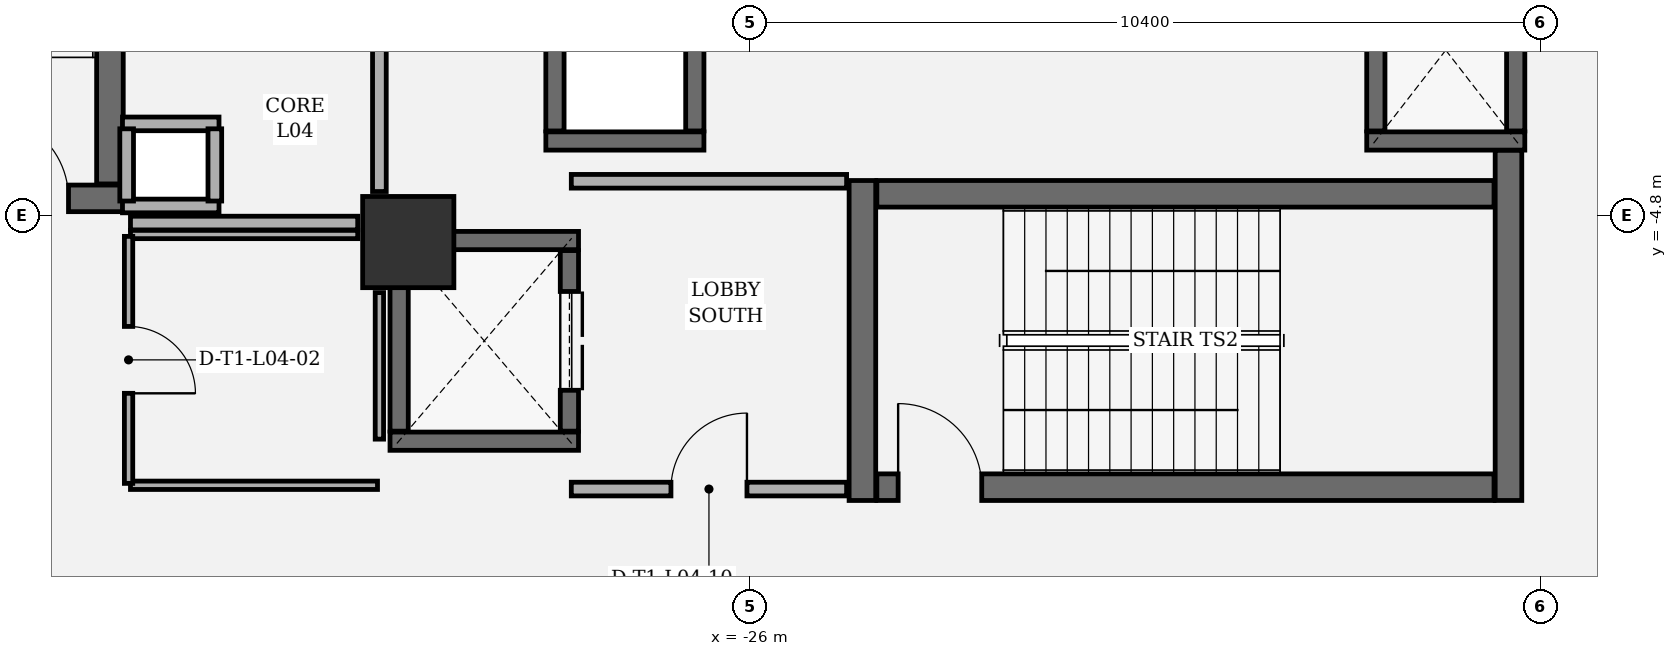
"""IFC4 building model, lengths in metres.
Left out: names, types, materials, properties, quantities, classifications, styles, units other than length and angle.
Written with IfcOpenShell. Run it as: python <this file> out.ifc"""

import sys

from ifc_helpers import new_model, si_unit, direction, frame, frame_2d, origin, origin_2d, place, context, subcontext, project, spatial, rectangle, extrude, element, fill, save


model = new_model("IFC4")
c1 = context("Model", 3, precision=1e-05, world=origin(), true_north=direction((0.0, 1.0)))
c2 = subcontext(c1, "Body", "Model", "MODEL_VIEW")
j1 = project(units=[si_unit("LENGTHUNIT", "METRE"), si_unit("PLANEANGLEUNIT", "RADIAN")], contexts=[c1])
p1 = place(None, origin())
s1 = spatial("IfcSite", under=j1, at=p1, CompositionType="ELEMENT")
p2 = place(p1, origin())
s2 = spatial("IfcBuilding", under=s1, at=p2, CompositionType="ELEMENT")
p3 = place(p2, frame((0.0, 0.0, 22.0)))
s3 = spatial("IfcBuildingStorey", under=s2, at=p3, CompositionType="ELEMENT", Elevation=22.0)
p4 = place(p3, frame((-30.5, -5.15, 0.0), z_axis=(0.0, 0.0, 1.0), x_axis=(1.0, 0.0, 0.0)))
e1 = element("IfcColumn", 1, at=p4, inside=s3, PredefinedType="COLUMN", context=c2, shape_type="SweptSolid", body=[
    extrude(rectangle(XDim=1.2, YDim=1.2, at=origin_2d()), origin(), (0.0, 0.0, 1.0), 5.0),
])
p5 = place(p3, frame((-13.635, -37.094, 0.0), z_axis=(0.0, 0.0, 1.0), x_axis=(-0.842602364841, 0.538536214905, 0.0)))
e2 = element("IfcWall", 2, at=p5, inside=s3, PredefinedType="SOLIDWALL", context=c2, shape_type="SweptSolid", body=[
    extrude(rectangle(XDim=60.27, YDim=0.38, at=frame_2d((30.135, 0.0))), origin(), (0.0, 0.0, 1.0), 4.58),
])
p6 = place(p5, frame((29.435, 0.0, 0.8)))
e3 = element("IfcOpeningElement", 3, at=p6, cuts=e2, PredefinedType="OPENING", context=c2, shape_type="SweptSolid", body=[
    extrude(rectangle(XDim=1.4, YDim=1.5, at=frame_2d((0.7, 0.75))), frame((0.0, 0.2, 0.0), z_axis=(0.0, -1.0, 0.0), x_axis=(1.0, 0.0, 0.0)), (0.0, 0.0, 1.0), 0.4),
])
p7 = place(p3, frame((-24.525, -4.34, 0.0), z_axis=(0.0, 0.0, 1.0), x_axis=(0.0, -1.0, 0.0)))
e4 = element("IfcWall", 4, at=p7, inside=s3, PredefinedType="SHEAR", context=c2, shape_type="SweptSolid", body=[
    extrude(rectangle(XDim=4.21, YDim=0.35, at=frame_2d((2.105, 0.0))), origin(), (0.0, 0.0, 1.0), 4.58),
])
p8 = place(p3, frame((-16.025, -8.55, 0.0), z_axis=(0.0, 0.0, 1.0), x_axis=(0.0, 1.0, 0.0)))
e5 = element("IfcWall", 5, at=p8, inside=s3, PredefinedType="SHEAR", context=c2, shape_type="SweptSolid", body=[
    extrude(rectangle(XDim=4.61, YDim=0.35, at=frame_2d((2.305, 0.0))), origin(), (0.0, 0.0, 1.0), 4.58),
])
p9 = place(p3, frame((-24.335, -8.375, 0.0), z_axis=(0.0, 0.0, 1.0), x_axis=(1.0, 0.0, 0.0)))
e6 = element("IfcWall", 6, at=p9, inside=s3, PredefinedType="SHEAR", context=c2, shape_type="SweptSolid", body=[
    extrude(rectangle(XDim=8.12, YDim=0.35, at=frame_2d((4.06, 0.0))), origin(), (0.0, 0.0, 1.0), 4.58),
])
p10 = place(p9, frame((0.28, 0.0, 0.0)))
e7 = element("IfcOpeningElement", 7, at=p10, cuts=e6, PredefinedType="OPENING", context=c2, shape_type="SweptSolid", body=[
    extrude(rectangle(XDim=1.1, YDim=2.2, at=frame_2d((0.55, 1.1))), frame((0.0, 0.185, 0.0), z_axis=(0.0, -1.0, 0.0), x_axis=(1.0, 0.0, 0.0)), (0.0, 0.0, 1.0), 0.37),
])
p11 = place(p3, frame((-16.215, -4.515, 0.0), z_axis=(0.0, 0.0, 1.0), x_axis=(-1.0, 0.0, 0.0)))
e8 = element("IfcWall", 8, at=p11, inside=s3, PredefinedType="SHEAR", context=c2, shape_type="SweptSolid", body=[
    extrude(rectangle(XDim=8.12, YDim=0.35, at=frame_2d((4.06, 0.0))), origin(), (0.0, 0.0, 1.0), 4.58),
])
p12 = place(p3, frame((-38.46, -4.575, 0.0), z_axis=(0.0, 0.0, 1.0), x_axis=(1.0, 0.0, 0.0)))
e9 = element("IfcWall", 9, at=p12, inside=s3, PredefinedType="SHEAR", context=c2, shape_type="SweptSolid", body=[
    extrude(rectangle(XDim=4.21, YDim=0.35, at=frame_2d((2.105, 0.0))), origin(), (0.0, 0.0, 1.0), 4.58),
])
p13 = place(p12, frame((2.39, 0.0, 0.0)))
e10 = element("IfcOpeningElement", 10, at=p13, cuts=e9, PredefinedType="OPENING", context=c2, shape_type="SweptSolid", body=[
    extrude(rectangle(XDim=1.1, YDim=2.2, at=frame_2d((0.55, 1.1))), frame((0.0, 0.185, 0.0), z_axis=(0.0, -1.0, 0.0), x_axis=(1.0, 0.0, 0.0)), (0.0, 0.0, 1.0), 0.37),
])
p14 = place(p3, frame((-34.425, -4.385, 0.0), z_axis=(0.0, 0.0, 1.0), x_axis=(0.0, 1.0, 0.0)))
e11 = element("IfcWall", 11, at=p14, inside=s3, PredefinedType="SHEAR", context=c2, shape_type="SweptSolid", body=[
    extrude(rectangle(XDim=8.77, YDim=0.35, at=frame_2d((4.385, 0.0))), origin(), (0.0, 0.0, 1.0), 4.58),
])
for number, where, z_axis, x_axis in (
    (12, (-28.26, -7.77, 0.0), (0.0, 0.0, 1.0), (-1.0, 0.0, 0.0)),
    (13, (-30.74, -5.13, 0.0), (0.0, 0.0, 1.0), (1.0, 0.0, 0.0)),
):
    element("IfcWall", number, at=place(p3, frame(where, z_axis=z_axis, x_axis=x_axis)), inside=s3, PredefinedType="SHEAR", context=c2, shape_type="SweptSolid", body=[
        extrude(rectangle(XDim=2.48, YDim=0.24, at=frame_2d((1.24, 0.0))), origin(), (0.0, 0.0, 1.0), 4.58),
    ])
p15 = place(p3, frame((-30.62, -7.638, 0.0), z_axis=(0.0, 0.0, 1.0), x_axis=(0.0, 1.0, 0.0)))
e14 = element("IfcWall", 14, at=p15, inside=s3, PredefinedType="SHEAR", context=c2, shape_type="SweptSolid", body=[
    extrude(rectangle(XDim=2.376, YDim=0.24, at=frame_2d((1.188, 0.0))), origin(), (0.0, 0.0, 1.0), 4.58),
])
p16 = place(p3, frame((-28.38, -5.262, 0.0), z_axis=(0.0, 0.0, 1.0), x_axis=(0.0, -1.0, 0.0)))
e15 = element("IfcWall", 15, at=p16, inside=s3, PredefinedType="SHEAR", context=c2, shape_type="SweptSolid", body=[
    extrude(rectangle(XDim=2.376, YDim=0.24, at=frame_2d((1.188, 0.0))), origin(), (0.0, 0.0, 1.0), 4.58),
])
p17 = place(p16, frame((0.538, 0.0, 0.0)))
e16 = element("IfcOpeningElement", 16, at=p17, cuts=e15, PredefinedType="OPENING", context=c2, shape_type="SweptSolid", body=[
    extrude(rectangle(XDim=1.3, YDim=2.3, at=frame_2d((0.65, 1.15))), frame((0.0, 0.13, 0.0), z_axis=(0.0, -1.0, 0.0), x_axis=(1.0, 0.0, 0.0)), (0.0, 0.0, 1.0), 0.26),
])
p18 = place(p3, frame((-26.61, -3.82, 0.0), z_axis=(0.0, 0.0, 1.0), x_axis=(-1.0, 0.0, 0.0)))
e17 = element("IfcWall", 17, at=p18, inside=s3, PredefinedType="SHEAR", context=c2, shape_type="SweptSolid", body=[
    extrude(rectangle(XDim=2.08, YDim=0.24, at=frame_2d((1.04, 0.0))), origin(), (0.0, 0.0, 1.0), 4.58),
])
for number, where, z_axis, x_axis in (
    (18, (-28.57, -3.688, 0.0), (0.0, 0.0, 1.0), (0.0, 1.0, 0.0)),
    (19, (-26.73, -1.562, 0.0), (0.0, 0.0, 1.0), (0.0, -1.0, 0.0)),
):
    element("IfcWall", number, at=place(p3, frame(where, z_axis=z_axis, x_axis=x_axis)), inside=s3, PredefinedType="SHEAR", context=c2, shape_type="SweptSolid", body=[
        extrude(rectangle(XDim=2.126, YDim=0.24, at=frame_2d((1.063, 0.0))), origin(), (0.0, 0.0, 1.0), 4.58),
    ])
p19 = place(p3, frame((-15.81, -3.82, 0.0), z_axis=(0.0, 0.0, 1.0), x_axis=(-1.0, 0.0, 0.0)))
e20 = element("IfcWall", 20, at=p19, inside=s3, PredefinedType="SHEAR", context=c2, shape_type="SweptSolid", body=[
    extrude(rectangle(XDim=2.08, YDim=0.24, at=frame_2d((1.04, 0.0))), origin(), (0.0, 0.0, 1.0), 4.58),
])
for number, where, z_axis, x_axis in (
    (21, (-17.77, -3.688, 0.0), (0.0, 0.0, 1.0), (0.0, 1.0, 0.0)),
    (22, (-15.93, -1.562, 0.0), (0.0, 0.0, 1.0), (0.0, -1.0, 0.0)),
):
    element("IfcWall", number, at=place(p3, frame(where, z_axis=z_axis, x_axis=x_axis)), inside=s3, PredefinedType="SHEAR", context=c2, shape_type="SweptSolid", body=[
        extrude(rectangle(XDim=2.126, YDim=0.24, at=frame_2d((1.063, 0.0))), origin(), (0.0, 0.0, 1.0), 4.58),
    ])
for number, where, z_axis, x_axis in (
    (23, (-32.99, -4.675, 0.0), (0.0, 0.0, 1.0), (-1.0, 0.0, 0.0)),
    (24, (-34.26, -3.595, 0.0), (0.0, 0.0, 1.0), (1.0, 0.0, 0.0)),
):
    element("IfcWall", number, at=place(p3, frame(where, z_axis=z_axis, x_axis=x_axis)), inside=s3, PredefinedType="PARTITIONING", context=c2, shape_type="SweptSolid", body=[
        extrude(rectangle(XDim=1.27, YDim=0.18, at=frame_2d((0.635, 0.0))), origin(), (0.0, 0.0, 1.0), 4.58),
    ])
for number, where, z_axis, x_axis in (
    (25, (-34.205, -4.61, 0.0), (0.0, 0.0, 1.0), (0.0, 1.0, 0.0)),
    (26, (-33.045, -3.66, 0.0), (0.0, 0.0, 1.0), (0.0, -1.0, 0.0)),
):
    element("IfcWall", number, at=place(p3, frame(where, z_axis=z_axis, x_axis=x_axis)), inside=s3, PredefinedType="PARTITIONING", context=c2, shape_type="SweptSolid", body=[
        extrude(rectangle(XDim=0.95, YDim=0.18, at=frame_2d((0.475, 0.0))), origin(), (0.0, 0.0, 1.0), 4.58),
    ])
p20 = place(p3, frame((-28.355, -8.4, 0.0), z_axis=(0.0, 0.0, 1.0), x_axis=(1.0, 0.0, 0.0)))
e27 = element("IfcWall", 27, at=p20, inside=s3, PredefinedType="PARTITIONING", context=c2, shape_type="SweptSolid", body=[
    extrude(rectangle(XDim=3.622, YDim=0.18, at=frame_2d((1.811, 0.0))), origin(), (0.0, 0.0, 1.0), 4.58),
])
p21 = place(p20, frame((1.311, 0.0, 0.0)))
e28 = element("IfcOpeningElement", 28, at=p21, cuts=e27, PredefinedType="OPENING", context=c2, shape_type="SweptSolid", body=[
    extrude(rectangle(XDim=1.0, YDim=2.15, at=frame_2d((0.5, 1.075))), frame((0.0, 0.1, 0.0), z_axis=(0.0, -1.0, 0.0), x_axis=(1.0, 0.0, 0.0)), (0.0, 0.0, 1.0), 0.2),
])
p22 = place(p3, frame((-24.733, -4.35, 0.0), z_axis=(0.0, 0.0, 1.0), x_axis=(-1.0, 0.0, 0.0)))
e29 = element("IfcWall", 29, at=p22, inside=s3, PredefinedType="PARTITIONING", context=c2, shape_type="SweptSolid", body=[
    extrude(rectangle(XDim=3.622, YDim=0.18, at=frame_2d((1.811, 0.0))), origin(), (0.0, 0.0, 1.0), 4.58),
])
p23 = place(p3, frame((-34.155, -8.35, 0.0), z_axis=(0.0, 0.0, 1.0), x_axis=(1.0, 0.0, 0.0)))
e30 = element("IfcWall", 30, at=p23, inside=s3, PredefinedType="PARTITIONING", context=c2, shape_type="SweptSolid", body=[
    extrude(rectangle(XDim=3.25, YDim=0.11, at=frame_2d((1.625, 0.0))), origin(), (0.0, 0.0, 1.0), 4.58),
])
p24 = place(p3, frame((-30.88, -7.743, 0.0), z_axis=(0.0, 0.0, 1.0), x_axis=(0.0, 1.0, 0.0)))
e31 = element("IfcWall", 31, at=p24, inside=s3, PredefinedType="PARTITIONING", context=c2, shape_type="SweptSolid", body=[
    extrude(rectangle(XDim=1.928, YDim=0.11, at=frame_2d((0.964, 0.0))), origin(), (0.0, 0.0, 1.0), 4.58),
])
p25 = place(p3, frame((-31.165, -5.05, 0.0), z_axis=(0.0, 0.0, 1.0), x_axis=(-1.0, 0.0, 0.0)))
e32 = element("IfcWall", 32, at=p25, inside=s3, PredefinedType="PARTITIONING", context=c2, shape_type="SweptSolid", body=[
    extrude(rectangle(XDim=2.99, YDim=0.11, at=frame_2d((1.495, 0.0))), origin(), (0.0, 0.0, 1.0), 4.58),
])
p26 = place(p3, frame((-34.18, -5.075, 0.0), z_axis=(0.0, 0.0, 1.0), x_axis=(0.0, -1.0, 0.0)))
e33 = element("IfcWall", 33, at=p26, inside=s3, PredefinedType="PARTITIONING", context=c2, shape_type="SweptSolid", body=[
    extrude(rectangle(XDim=3.25, YDim=0.11, at=frame_2d((1.625, 0.0))), origin(), (0.0, 0.0, 1.0), 4.58),
])
p27 = place(p26, frame((1.185, 0.0, 0.0)))
e34 = element("IfcOpeningElement", 34, at=p27, cuts=e33, PredefinedType="OPENING", context=c2, shape_type="SweptSolid", body=[
    extrude(rectangle(XDim=0.88, YDim=2.1, at=frame_2d((0.44, 1.05))), frame((0.0, 0.065, 0.0), z_axis=(0.0, -1.0, 0.0), x_axis=(1.0, 0.0, 0.0)), (0.0, 0.0, 1.0), 0.13),
])
p28 = place(p3, frame((-34.155, -4.9, 0.0), z_axis=(0.0, 0.0, 1.0), x_axis=(1.0, 0.0, 0.0)))
e35 = element("IfcWall", 35, at=p28, inside=s3, PredefinedType="PARTITIONING", context=c2, shape_type="SweptSolid", body=[
    extrude(rectangle(XDim=2.99, YDim=0.18, at=frame_2d((1.495, 0.0))), origin(), (0.0, 0.0, 1.0), 4.58),
])
p29 = place(p3, frame((-30.88, -4.485, 0.0), z_axis=(0.0, 0.0, 1.0), x_axis=(0.0, 1.0, 0.0)))
e36 = element("IfcWall", 36, at=p29, inside=s3, PredefinedType="PARTITIONING", context=c2, shape_type="SweptSolid", body=[
    extrude(rectangle(XDim=2.86, YDim=0.18, at=frame_2d((1.43, 0.0))), origin(), (0.0, 0.0, 1.0), 4.58),
])
p30 = place(p10, origin())
e37 = element("IfcDoor", 37, at=p30, inside=s3, OperationType="SINGLE_SWING_LEFT", PredefinedType="DOOR", context=c2, shape_type="SweptSolid", body=[
    extrude(rectangle(XDim=1.1, YDim=2.2, at=frame_2d((0.55, 1.1))), frame((0.0, 0.025, 0.0), z_axis=(0.0, -1.0, 0.0), x_axis=(1.0, 0.0, 0.0)), (0.0, 0.0, 1.0), 0.05),
])
fill(e7, e37)
p31 = place(p13, origin())
e38 = element("IfcDoor", 38, at=p31, inside=s3, OperationType="SINGLE_SWING_LEFT", PredefinedType="DOOR", context=c2, shape_type="SweptSolid", body=[
    extrude(rectangle(XDim=1.1, YDim=2.2, at=frame_2d((0.55, 1.1))), frame((0.0, 0.025, 0.0), z_axis=(0.0, -1.0, 0.0), x_axis=(1.0, 0.0, 0.0)), (0.0, 0.0, 1.0), 0.05),
])
fill(e10, e38)
p32 = place(p17, origin())
e39 = element("IfcDoor", 39, at=p32, inside=s3, OperationType="DOUBLE_DOOR_SLIDING", PredefinedType="DOOR", context=c2, shape_type="SweptSolid", body=[
    extrude(rectangle(XDim=1.3, YDim=2.3, at=frame_2d((0.65, 1.15))), frame((0.0, 0.025, 0.0), z_axis=(0.0, -1.0, 0.0), x_axis=(1.0, 0.0, 0.0)), (0.0, 0.0, 1.0), 0.05),
])
fill(e16, e39)
p33 = place(p27, origin())
e40 = element("IfcDoor", 40, at=p33, inside=s3, OperationType="SINGLE_SWING_RIGHT", PredefinedType="DOOR", context=c2, shape_type="SweptSolid", body=[
    extrude(rectangle(XDim=0.88, YDim=2.1, at=frame_2d((0.44, 1.05))), frame((0.0, 0.025, 0.0), z_axis=(0.0, -1.0, 0.0), x_axis=(1.0, 0.0, 0.0)), (0.0, 0.0, 1.0), 0.05),
])
fill(e34, e40)
p34 = place(p21, origin())
e41 = element("IfcDoor", 41, at=p34, inside=s3, OperationType="SINGLE_SWING_RIGHT", PredefinedType="DOOR", context=c2, shape_type="SweptSolid", body=[
    extrude(rectangle(XDim=1.0, YDim=2.15, at=frame_2d((0.5, 1.075))), frame((0.0, 0.025, 0.0), z_axis=(0.0, -1.0, 0.0), x_axis=(1.0, 0.0, 0.0)), (0.0, 0.0, 1.0), 0.05),
])
fill(e28, e41)
save(model, sys.argv[1])
